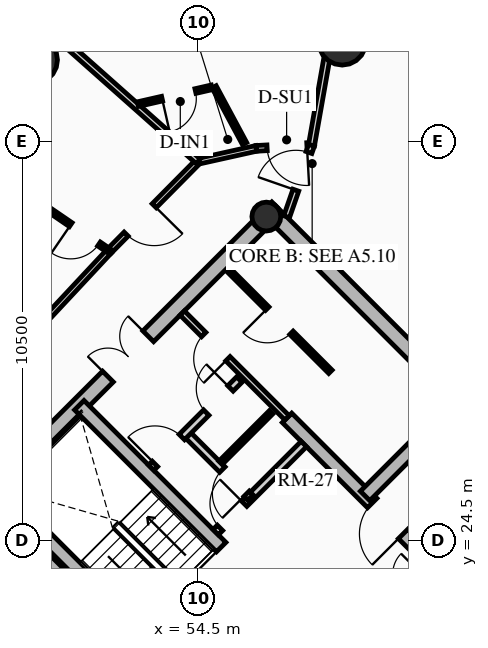
"""IFC4 building model, lengths in metres.
Left out: names, types, materials, properties, quantities, classifications, styles, units other than length and angle.
Written with IfcOpenShell. Run it as: python <this file> out.ifc"""

import sys

from ifc_helpers import new_model, si_unit, direction, frame, frame_2d, origin, origin_2d, place, context, subcontext, project, spatial, rectangle, circle, hollow_circle, extrude, source, transform, mapped, element, fill, save


model = new_model("IFC4")
c1 = context("Model", 3, precision=1e-05, world=origin(), true_north=direction((0.0, 1.0)))
c2 = subcontext(c1, "Body", "Model", "MODEL_VIEW")
j1 = project(units=[si_unit("LENGTHUNIT", "METRE"), si_unit("PLANEANGLEUNIT", "RADIAN")], contexts=[c1])
p1 = place(None, origin())
s1 = spatial("IfcSite", under=j1, at=p1, CompositionType="ELEMENT")
p2 = place(p1, origin())
s2 = spatial("IfcBuilding", under=s1, at=p2, CompositionType="ELEMENT")
p3 = place(p2, frame((0.0, 0.0, 151.6)))
s3 = spatial("IfcBuildingStorey", under=s2, at=p3, CompositionType="ELEMENT", Elevation=151.6)
for number, where, z_axis, x_axis in (
    (1, (58.702, 15.732, 0.0), (0.0, 0.0, 1.0), (-0.707, 0.707, 0.0)),
    (2, (66.268, 23.298, 0.0), (0.0, 0.0, 1.0), (-0.707, 0.707, 0.0)),
):
    element("IfcWall", number, at=place(p3, frame(where, z_axis=z_axis, x_axis=x_axis)), inside=s3, PredefinedType="SHEAR", context=c2, shape_type="SweptSolid", body=[
        extrude(rectangle(XDim=14.1, YDim=0.4, at=frame_2d((7.05, 0.0))), origin(), (0.0, 0.0, 1.0), 2.91),
    ])
p4 = place(p3, frame((48.873, 25.561, 0.0), z_axis=(0.0, 0.0, 1.0), x_axis=(0.707106781187, 0.707106781187, 0.0)))
e3 = element("IfcWall", 3, at=p4, inside=s3, PredefinedType="SHEAR", context=c2, shape_type="SweptSolid", body=[
    extrude(rectangle(XDim=10.7, YDim=0.4, at=frame_2d((5.35, 0.0))), origin(), (0.0, 0.0, 1.0), 2.91),
])
m1 = source(origin(), c2, "Body", "SweptSolid", [
    extrude(rectangle(XDim=1.5, YDim=2.02, at=frame_2d((0.75, 1.01))), frame((0.0, 0.21, 0.0), z_axis=(0.0, -1.0, 0.0), x_axis=(1.0, 0.0, 0.0)), (0.0, 0.0, 1.0), 0.42),
])
p5 = place(p4, frame((4.6, 0.0, 0.0)))
e4 = element("IfcOpeningElement", 4, at=p5, cuts=e3, PredefinedType="OPENING", context=c2, shape_type="MappedRepresentation", body=[
    mapped(m1, transform((0.0, 0.0, 0.0), x_axis=(1.0, 0.0, 0.0), y_axis=(0.0, 1.0, 0.0), z_axis=(0.0, 0.0, 1.0), scale=1.0)),
])
p6 = place(p3, frame((61.06, 18.373, 0.0), z_axis=(0.0, 0.0, 1.0), x_axis=(-0.707106781187, 0.707106781187, 0.0)))
e5 = element("IfcWall", 5, at=p6, inside=s3, PredefinedType="SHEAR", context=c2, shape_type="SweptSolid", body=[
    extrude(rectangle(XDim=13.7, YDim=0.35, at=frame_2d((6.85, 0.0))), origin(), (0.0, 0.0, 1.0), 2.91),
])
m2 = source(origin(), c2, "Body", "SweptSolid", [
    extrude(rectangle(XDim=1.1, YDim=2.015, at=frame_2d((0.55, 1.007))), frame((0.0, 0.185, 0.0), z_axis=(0.0, -1.0, 0.0), x_axis=(1.0, 0.0, 0.0)), (0.0, 0.0, 1.0), 0.37),
])
p7 = place(p6, frame((4.85, 0.0, 0.0)))
e6 = element("IfcOpeningElement", 6, at=p7, cuts=e5, PredefinedType="OPENING", context=c2, shape_type="MappedRepresentation", body=[
    mapped(m2, transform((0.0, 0.0, 0.0), x_axis=(1.0, 0.0, 0.0), y_axis=(0.0, 1.0, 0.0), z_axis=(0.0, 0.0, 1.0), scale=1.0)),
])
p8 = place(p6, frame((0.625, 0.0, 0.0)))
e7 = element("IfcOpeningElement", 7, at=p8, cuts=e5, PredefinedType="OPENING", context=c2, shape_type="MappedRepresentation", body=[
    mapped(m2, transform((0.0, 0.0, 0.0), x_axis=(1.0, 0.0, 0.0), y_axis=(0.0, 1.0, 0.0), z_axis=(0.0, 0.0, 1.0), scale=1.0)),
])
p9 = place(p6, frame((2.625, 0.0, 0.0)))
e8 = element("IfcOpeningElement", 8, at=p9, cuts=e5, PredefinedType="OPENING", context=c2, shape_type="MappedRepresentation", body=[
    mapped(m2, transform((0.0, 0.0, 0.0), x_axis=(1.0, 0.0, 0.0), y_axis=(0.0, 1.0, 0.0), z_axis=(0.0, 0.0, 1.0), scale=1.0)),
])
m3 = source(origin(), c2, "Body", "SweptSolid", [
    extrude(rectangle(XDim=1.15, YDim=2.02, at=frame_2d((0.575, 1.01))), frame((0.0, 0.185, 0.0), z_axis=(0.0, -1.0, 0.0), x_axis=(1.0, 0.0, 0.0)), (0.0, 0.0, 1.0), 0.37),
])
p10 = place(p6, frame((7.27, 0.0, 0.0)))
e9 = element("IfcOpeningElement", 9, at=p10, cuts=e5, PredefinedType="OPENING", context=c2, shape_type="MappedRepresentation", body=[
    mapped(m3, transform((0.0, 0.0, 0.0), x_axis=(1.0, 0.0, 0.0), y_axis=(0.0, 1.0, 0.0), z_axis=(0.0, 0.0, 1.0), scale=1.0)),
])
p11 = place(p3, frame((63.627, 20.94, 0.0), z_axis=(0.0, 0.0, 1.0), x_axis=(-0.707119496762, 0.707094065383, 0.0)))
e10 = element("IfcWall", 10, at=p11, inside=s3, PredefinedType="SHEAR", context=c2, shape_type="SweptSolid", body=[
    extrude(rectangle(XDim=9.6, YDim=0.35, at=frame_2d((4.8, 0.0))), origin(), (0.0, 0.0, 1.0), 2.91),
])
p12 = place(p11, frame((5.28, 0.0, 0.0)))
e11 = element("IfcOpeningElement", 11, at=p12, cuts=e10, PredefinedType="OPENING", context=c2, shape_type="MappedRepresentation", body=[
    mapped(m3, transform((0.0, 0.0, 0.0), x_axis=(1.0, 0.0, 0.0), y_axis=(0.0, 1.0, 0.0), z_axis=(0.0, 0.0, 1.0), scale=1.0)),
])
p13 = place(p3, frame((53.922, 21.141, 0.0), z_axis=(0.0, 0.0, 1.0), x_axis=(-0.707106781187, 0.707106781187, 0.0)))
e12 = element("IfcWall", 12, at=p13, inside=s3, PredefinedType="SHEAR", context=c2, shape_type="SweptSolid", body=[
    extrude(rectangle(XDim=6.695, YDim=0.35, at=frame_2d((3.348, 0.0))), origin(), (0.0, 0.0, 1.0), 2.91),
])
p14 = place(p3, frame((58.893, 25.674, 0.0), z_axis=(0.0, 0.0, 1.0), x_axis=(0.707106781187, 0.707106781187, 0.0)))
e13 = element("IfcWall", 13, at=p14, inside=s3, PredefinedType="SHEAR", context=c2, shape_type="SweptSolid", body=[
    extrude(rectangle(XDim=3.285, YDim=0.35, at=frame_2d((1.643, 0.0))), origin(), (0.0, 0.0, 1.0), 2.91),
])
p15 = place(p3, frame((56.294, 33.024, 0.0), z_axis=(0.0, 0.0, 1.0), x_axis=(0.707106781187, 0.707106781187, 0.0)))
e14 = element("IfcColumn", 14, at=p15, inside=s3, PredefinedType="COLUMN", context=c2, shape_type="SweptSolid", body=[
    extrude(hollow_circle(Radius=0.38, WallThickness=0.032, at=origin_2d()), origin(), (0.0, 0.0, 1.0), 2.91),
])
for number, where, z_axis, x_axis in (
    (15, (58.291, 37.635, 0.0), (0.0, 0.0, 1.0), (1.0, 0.0, 0.0)),
    (16, (50.173, 37.146, 0.0), (0.0, 0.0, 1.0), (1.0, 0.0, 0.0)),
):
    element("IfcColumn", number, at=place(p3, frame(where, z_axis=z_axis, x_axis=x_axis)), inside=s3, PredefinedType="USERDEFINED", context=c2, shape_type="SweptSolid", body=[
        extrude(circle(Radius=0.625, at=origin_2d()), origin(), (0.0, 0.0, 1.0), 2.91),
    ])
p16 = place(p3, frame((58.214, 21.467, 0.0), z_axis=(0.0, 0.0, 1.0), x_axis=(0.707106781187, 0.707106781187, 0.0)))
e17 = element("IfcWall", 17, at=p16, inside=s3, PredefinedType="PARTITIONING", context=c2, shape_type="SweptSolid", body=[
    extrude(rectangle(XDim=3.28, YDim=0.2, at=frame_2d((1.64, 0.0))), origin(), (0.0, 0.0, 1.0), 2.675),
])
m4 = source(origin(), c2, "Body", "SweptSolid", [
    extrude(rectangle(XDim=1.5, YDim=2.02, at=frame_2d((0.75, 1.01))), frame((0.0, 0.11, 0.0), z_axis=(0.0, -1.0, 0.0), x_axis=(1.0, 0.0, 0.0)), (0.0, 0.0, 1.0), 0.22),
])
p17 = place(p16, frame((1.55, 0.0, 0.0)))
e18 = element("IfcOpeningElement", 18, at=p17, cuts=e17, PredefinedType="OPENING", context=c2, shape_type="MappedRepresentation", body=[
    mapped(m4, transform((0.0, 0.0, 0.0), x_axis=(1.0, 0.0, 0.0), y_axis=(0.0, 1.0, 0.0), z_axis=(0.0, 0.0, 1.0), scale=1.0)),
])
p18 = place(p3, frame((54.961, 24.719, 0.0), z_axis=(0.0, 0.0, 1.0), x_axis=(0.707106781187, 0.707106781187, 0.0)))
e19 = element("IfcWall", 19, at=p18, inside=s3, PredefinedType="PARTITIONING", context=c2, shape_type="SweptSolid", body=[
    extrude(rectangle(XDim=3.28, YDim=0.2, at=frame_2d((1.64, 0.0))), origin(), (0.0, 0.0, 1.0), 2.675),
])
m5 = source(origin(), c2, "Body", "SweptSolid", [
    extrude(rectangle(XDim=0.9, YDim=2.005, at=frame_2d((0.45, 1.002))), frame((0.0, 0.11, 0.0), z_axis=(0.0, -1.0, 0.0), x_axis=(1.0, 0.0, 0.0)), (0.0, 0.0, 1.0), 0.22),
])
p19 = place(p18, frame((0.16, 0.0, 0.0)))
e20 = element("IfcOpeningElement", 20, at=p19, cuts=e19, PredefinedType="OPENING", context=c2, shape_type="MappedRepresentation", body=[
    mapped(m5, transform((0.0, 0.0, 0.0), x_axis=(1.0, 0.0, 0.0), y_axis=(0.0, 1.0, 0.0), z_axis=(0.0, 0.0, 1.0), scale=1.0)),
])
p20 = place(p3, frame((55.874, 25.631, 0.0), z_axis=(0.0, 0.0, 1.0), x_axis=(-0.707157639372, 0.707055919343, 0.0)))
e21 = element("IfcWall", 21, at=p20, inside=s3, PredefinedType="PARTITIONING", context=c2, shape_type="SweptSolid", body=[
    extrude(rectangle(XDim=2.4, YDim=0.2, at=frame_2d((1.2, 0.0))), origin(), (0.0, 0.0, 1.0), 2.675),
])
p21 = place(p20, frame((0.14, 0.0, 0.0)))
e22 = element("IfcOpeningElement", 22, at=p21, cuts=e21, PredefinedType="OPENING", context=c2, shape_type="MappedRepresentation", body=[
    mapped(m5, transform((0.0, 0.0, 0.0), x_axis=(1.0, 0.0, 0.0), y_axis=(0.0, 1.0, 0.0), z_axis=(0.0, 0.0, 1.0), scale=1.0)),
])
p22 = place(p3, frame((53.264, 26.416, 0.0), z_axis=(0.0, 0.0, 1.0), x_axis=(0.707106781187, 0.707106781187, 0.0)))
e23 = element("IfcWall", 23, at=p22, inside=s3, PredefinedType="PARTITIONING", context=c2, shape_type="SweptSolid", body=[
    extrude(rectangle(XDim=3.28, YDim=0.2, at=frame_2d((1.64, 0.0))), origin(), (0.0, 0.0, 1.0), 2.675),
])
m6 = source(origin(), c2, "Body", "SweptSolid", [
    extrude(rectangle(XDim=1.0, YDim=2.015, at=frame_2d((0.5, 1.007))), frame((0.0, 0.11, 0.0), z_axis=(0.0, -1.0, 0.0), x_axis=(1.0, 0.0, 0.0)), (0.0, 0.0, 1.0), 0.22),
])
p23 = place(p22, frame((0.14, 0.0, 0.0)))
e24 = element("IfcOpeningElement", 24, at=p23, cuts=e23, PredefinedType="OPENING", context=c2, shape_type="MappedRepresentation", body=[
    mapped(m6, transform((0.0, 0.0, 0.0), x_axis=(1.0, 0.0, 0.0), y_axis=(0.0, 1.0, 0.0), z_axis=(0.0, 0.0, 1.0), scale=1.0)),
])
p24 = place(p22, frame((2.05, 0.0, 0.0)))
e25 = element("IfcOpeningElement", 25, at=p24, cuts=e23, PredefinedType="OPENING", context=c2, shape_type="MappedRepresentation", body=[
    mapped(m5, transform((0.0, 0.0, 0.0), x_axis=(1.0, 0.0, 0.0), y_axis=(0.0, 1.0, 0.0), z_axis=(0.0, 0.0, 1.0), scale=1.0)),
])
p25 = place(p3, frame((55.089, 26.543, 0.0), z_axis=(0.0, 0.0, 1.0), x_axis=(0.707106781187, 0.707106781187, 0.0)))
e26 = element("IfcWall", 26, at=p25, inside=s3, PredefinedType="PARTITIONING", context=c2, shape_type="SweptSolid", body=[
    extrude(rectangle(XDim=1.88, YDim=0.125, at=frame_2d((0.94, 0.0))), origin(), (0.0, 0.0, 1.0), 2.675),
])
p26 = place(p3, frame((56.839, 27.728, 0.0), z_axis=(0.0, 0.0, 1.0), x_axis=(-0.707106781187, 0.707106781187, 0.0)))
e27 = element("IfcWall", 27, at=p26, inside=s3, PredefinedType="PARTITIONING", context=c2, shape_type="SweptSolid", body=[
    extrude(rectangle(XDim=3.9, YDim=0.16, at=frame_2d((1.95, 0.0))), origin(), (0.0, 0.0, 1.0), 2.675),
])
m7 = source(origin(), c2, "Body", "SweptSolid", [
    extrude(rectangle(XDim=0.9, YDim=2.005, at=frame_2d((0.45, 1.002))), frame((0.0, 0.09, 0.0), z_axis=(0.0, -1.0, 0.0), x_axis=(1.0, 0.0, 0.0)), (0.0, 0.0, 1.0), 0.18),
])
p27 = place(p26, frame((2.2, 0.0, 0.0)))
e28 = element("IfcOpeningElement", 28, at=p27, cuts=e27, PredefinedType="OPENING", context=c2, shape_type="MappedRepresentation", body=[
    mapped(m7, transform((0.0, 0.0, 0.0), x_axis=(1.0, 0.0, 0.0), y_axis=(0.0, 1.0, 0.0), z_axis=(0.0, 0.0, 1.0), scale=1.0)),
])
p28 = place(p3, frame((57.981, 28.941, 0.0), z_axis=(0.0, 0.0, 1.0), x_axis=(-0.707074823725, 0.707138737204, 0.0)))
e29 = element("IfcWall", 29, at=p28, inside=s3, PredefinedType="PARTITIONING", context=c2, shape_type="SweptSolid", body=[
    extrude(rectangle(XDim=3.82, YDim=0.125, at=frame_2d((1.91, 0.0))), origin(), (0.0, 0.0, 1.0), 2.675),
])
m8 = source(origin(), c2, "Body", "SweptSolid", [
    extrude(rectangle(XDim=0.9, YDim=2.005, at=frame_2d((0.45, 1.002))), frame((0.0, 0.073, 0.0), z_axis=(0.0, -1.0, 0.0), x_axis=(1.0, 0.0, 0.0)), (0.0, 0.0, 1.0), 0.145),
])
p29 = place(p28, frame((1.45, 0.0, 0.0)))
e30 = element("IfcOpeningElement", 30, at=p29, cuts=e29, PredefinedType="OPENING", context=c2, shape_type="MappedRepresentation", body=[
    mapped(m8, transform((0.0, 0.0, 0.0), x_axis=(1.0, 0.0, 0.0), y_axis=(0.0, 1.0, 0.0), z_axis=(0.0, 0.0, 1.0), scale=1.0)),
])
p30 = place(p3, frame((57.482, 34.899, 0.0), z_axis=(0.0, 0.0, 1.0), x_axis=(-0.998466026722, -0.055367801852, 0.0)))
e31 = element("IfcWall", 31, at=p30, inside=s3, PredefinedType="PARTITIONING", context=c2, shape_type="SweptSolid", body=[
    extrude(rectangle(XDim=1.455, YDim=0.15, at=frame_2d((0.728, 0.0))), origin(), (0.0, 0.0, 1.0), 2.245),
])
m9 = source(origin(), c2, "Body", "SweptSolid", [
    extrude(rectangle(XDim=1.05, YDim=2.015, at=frame_2d((0.525, 1.007))), frame((0.0, 0.085, 0.0), z_axis=(0.0, -1.0, 0.0), x_axis=(1.0, 0.0, 0.0)), (0.0, 0.0, 1.0), 0.17),
])
p31 = place(p30, frame((0.12, 0.0, 0.0)))
e32 = element("IfcOpeningElement", 32, at=p31, cuts=e31, PredefinedType="OPENING", context=c2, shape_type="MappedRepresentation", body=[
    mapped(m9, transform((0.0, 0.0, 0.0), x_axis=(1.0, 0.0, 0.0), y_axis=(0.0, 1.0, 0.0), z_axis=(0.0, 0.0, 1.0), scale=1.0)),
])
p32 = place(p3, frame((56.029, 34.819, 0.0), z_axis=(0.0, 0.0, 1.0), x_axis=(-0.976117289068, -0.217244189754, 0.0)))
e33 = element("IfcWall", 33, at=p32, inside=s3, PredefinedType="PARTITIONING", context=c2, shape_type="SweptSolid", body=[
    extrude(rectangle(XDim=1.565, YDim=0.15, at=frame_2d((0.783, 0.0))), origin(), (0.0, 0.0, 1.0), 2.245),
])
p33 = place(p3, frame((54.501, 34.479, 0.0), z_axis=(0.0, 0.0, 1.0), x_axis=(-0.70346073929, -0.710734119258, 0.0)))
e34 = element("IfcWall", 34, at=p33, inside=s3, PredefinedType="PARTITIONING", context=c2, shape_type="SweptSolid", body=[
    extrude(rectangle(XDim=3.323, YDim=0.15, at=frame_2d((1.662, 0.0))), origin(), (0.0, 0.0, 1.0), 2.245),
])
p34 = place(p33, frame((1.645, 0.0, 0.0)))
e35 = element("IfcOpeningElement", 35, at=p34, cuts=e34, PredefinedType="OPENING", context=c2, shape_type="MappedRepresentation", body=[
    mapped(m9, transform((0.0, 0.0, 0.0), x_axis=(1.0, 0.0, 0.0), y_axis=(0.0, 1.0, 0.0), z_axis=(0.0, 0.0, 1.0), scale=1.0)),
])
p35 = place(p3, frame((52.163, 32.117, 0.0), z_axis=(0.0, 0.0, 1.0), x_axis=(-0.682485296115, -0.730899323154, 0.0)))
e36 = element("IfcWall", 36, at=p35, inside=s3, PredefinedType="PARTITIONING", context=c2, shape_type="SweptSolid", body=[
    extrude(rectangle(XDim=6.404, YDim=0.15, at=frame_2d((3.202, 0.0))), origin(), (0.0, 0.0, 1.0), 2.245),
])
p36 = place(p3, frame((57.482, 34.899, 0.0), z_axis=(0.0, 0.0, 1.0), x_axis=(0.174251112754, 0.98470124896, 0.0)))
e37 = element("IfcWall", 37, at=p36, inside=s3, PredefinedType="PARTITIONING", context=c2, shape_type="SweptSolid", body=[
    extrude(rectangle(XDim=5.352, YDim=0.16, at=frame_2d((2.676, 0.0))), origin(), (0.0, 0.0, 1.0), 2.245),
])
p37 = place(p3, frame((54.501, 34.479, 0.0), z_axis=(0.0, 0.0, 1.0), x_axis=(-0.747641382601, 0.66410267506, 0.0)))
e38 = element("IfcWall", 38, at=p37, inside=s3, PredefinedType="PARTITIONING", context=c2, shape_type="SweptSolid", body=[
    extrude(rectangle(XDim=7.718, YDim=0.16, at=frame_2d((3.859, 0.0))), origin(), (0.0, 0.0, 1.0), 2.245),
])
p38 = place(p3, frame((56.828, 33.021, 0.0), z_axis=(0.0, 0.0, 1.0), x_axis=(0.328682472103, 0.944440486496, 0.0)))
e39 = element("IfcWall", 39, at=p38, inside=s3, PredefinedType="PARTITIONING", context=c2, shape_type="SweptSolid", body=[
    extrude(rectangle(XDim=1.989, YDim=0.16, at=frame_2d((0.995, 0.0))), origin(), (0.0, 0.0, 1.0), 2.245),
])
m10 = source(origin(), c2, "Body", "SweptSolid", [
    extrude(rectangle(XDim=1.05, YDim=2.015, at=frame_2d((0.525, 1.007))), frame((0.0, 0.09, 0.0), z_axis=(0.0, -1.0, 0.0), x_axis=(1.0, 0.0, 0.0)), (0.0, 0.0, 1.0), 0.18),
])
p39 = place(p38, frame((0.739, 0.0, 0.0)))
e40 = element("IfcOpeningElement", 40, at=p39, cuts=e39, PredefinedType="OPENING", context=c2, shape_type="MappedRepresentation", body=[
    mapped(m10, transform((0.0, 0.0, 0.0), x_axis=(1.0, 0.0, 0.0), y_axis=(0.0, 1.0, 0.0), z_axis=(0.0, 0.0, 1.0), scale=1.0)),
])
p40 = place(p3, frame((55.722, 34.944, 0.0), z_axis=(0.0, 0.0, 1.0), x_axis=(-0.473482169178, 0.880803403417, 0.0)))
e41 = element("IfcWall", 41, at=p40, inside=s3, PredefinedType="PARTITIONING", context=c2, shape_type="SweptSolid", body=[
    extrude(rectangle(XDim=1.698, YDim=0.125, at=frame_2d((0.849, 0.0))), origin(), (0.0, 0.0, 1.0), 2.245),
])
p41 = place(p3, frame((54.858, 36.425, 0.0), z_axis=(0.0, 0.0, 1.0), x_axis=(-0.975061820415, -0.221933427785, 0.0)))
e42 = element("IfcWall", 42, at=p41, inside=s3, PredefinedType="PARTITIONING", context=c2, shape_type="SweptSolid", body=[
    extrude(rectangle(XDim=1.993, YDim=0.125, at=frame_2d((0.997, 0.0))), origin(), (0.0, 0.0, 1.0), 2.312),
])
p42 = place(p41, frame((0.44, 0.0, 0.0)))
e43 = element("IfcOpeningElement", 43, at=p42, cuts=e42, PredefinedType="OPENING", context=c2, shape_type="MappedRepresentation", body=[
    mapped(m8, transform((0.0, 0.0, 0.0), x_axis=(1.0, 0.0, 0.0), y_axis=(0.0, 1.0, 0.0), z_axis=(0.0, 0.0, 1.0), scale=1.0)),
])
p43 = place(p3, frame((52.163, 32.117, 0.0), z_axis=(0.0, 0.0, 1.0), x_axis=(-0.825403853282, 0.564542716707, 0.0)))
e44 = element("IfcWall", 44, at=p43, inside=s3, PredefinedType="PARTITIONING", context=c2, shape_type="SweptSolid", body=[
    extrude(rectangle(XDim=8.74, YDim=0.125, at=frame_2d((4.37, 0.0))), origin(), (0.0, 0.0, 1.0), 2.245),
])
p44 = place(p43, frame((0.33, 0.0, 0.0)))
e45 = element("IfcOpeningElement", 45, at=p44, cuts=e44, PredefinedType="OPENING", context=c2, shape_type="MappedRepresentation", body=[
    mapped(m8, transform((0.0, 0.0, 0.0), x_axis=(1.0, 0.0, 0.0), y_axis=(0.0, 1.0, 0.0), z_axis=(0.0, 0.0, 1.0), scale=1.0)),
])
m11 = source(origin(), c2, "Body", "SweptSolid", [
    extrude(rectangle(XDim=1.15, YDim=2.02, at=frame_2d((0.575, 1.01))), frame((0.0, 0.025, 0.0), z_axis=(0.0, -1.0, 0.0), x_axis=(1.0, 0.0, 0.0)), (0.0, 0.0, 1.0), 0.05),
])
p45 = place(p10, origin())
e46 = element("IfcDoor", 46, at=p45, inside=s3, OperationType="SINGLE_SWING_RIGHT", PredefinedType="DOOR", context=c2, shape_type="MappedRepresentation", body=[
    mapped(m11, transform((0.0, 0.0, 0.0), x_axis=(1.0, 0.0, 0.0), y_axis=(0.0, 1.0, 0.0), z_axis=(0.0, 0.0, 1.0), scale=1.0)),
])
fill(e9, e46)
p46 = place(p12, origin())
e47 = element("IfcDoor", 47, at=p46, inside=s3, OperationType="SINGLE_SWING_LEFT", PredefinedType="DOOR", context=c2, shape_type="MappedRepresentation", body=[
    mapped(m11, transform((0.0, 0.0, 0.0), x_axis=(1.0, 0.0, 0.0), y_axis=(0.0, 1.0, 0.0), z_axis=(0.0, 0.0, 1.0), scale=1.0)),
])
fill(e11, e47)
m12 = source(origin(), c2, "Body", "SweptSolid", [
    extrude(rectangle(XDim=1.5, YDim=2.02, at=frame_2d((0.75, 1.01))), frame((0.0, 0.025, 0.0), z_axis=(0.0, -1.0, 0.0), x_axis=(1.0, 0.0, 0.0)), (0.0, 0.0, 1.0), 0.05),
])
p47 = place(p5, origin())
e48 = element("IfcDoor", 48, at=p47, inside=s3, OperationType="DOUBLE_DOOR_SINGLE_SWING", PredefinedType="DOOR", context=c2, shape_type="MappedRepresentation", body=[
    mapped(m12, transform((0.0, 0.0, 0.0), x_axis=(1.0, 0.0, 0.0), y_axis=(0.0, 1.0, 0.0), z_axis=(0.0, 0.0, 1.0), scale=1.0)),
])
fill(e4, e48)
m13 = source(origin(), c2, "Body", "SweptSolid", [
    extrude(rectangle(XDim=0.9, YDim=2.005, at=frame_2d((0.45, 1.002))), frame((0.0, 0.025, 0.0), z_axis=(0.0, -1.0, 0.0), x_axis=(1.0, 0.0, 0.0)), (0.0, 0.0, 1.0), 0.05),
])
p48 = place(p19, origin())
e49 = element("IfcDoor", 49, at=p48, inside=s3, OperationType="SINGLE_SWING_RIGHT", PredefinedType="DOOR", context=c2, shape_type="MappedRepresentation", body=[
    mapped(m13, transform((0.0, 0.0, 0.0), x_axis=(1.0, 0.0, 0.0), y_axis=(0.0, 1.0, 0.0), z_axis=(0.0, 0.0, 1.0), scale=1.0)),
])
fill(e20, e49)
m14 = source(origin(), c2, "Body", "SweptSolid", [
    extrude(rectangle(XDim=1.0, YDim=2.015, at=frame_2d((0.5, 1.007))), frame((0.0, 0.025, 0.0), z_axis=(0.0, -1.0, 0.0), x_axis=(1.0, 0.0, 0.0)), (0.0, 0.0, 1.0), 0.05),
])
p49 = place(p23, origin())
e50 = element("IfcDoor", 50, at=p49, inside=s3, OperationType="SINGLE_SWING_LEFT", PredefinedType="DOOR", context=c2, shape_type="MappedRepresentation", body=[
    mapped(m14, transform((0.0, 0.0, 0.0), x_axis=(1.0, 0.0, 0.0), y_axis=(0.0, 1.0, 0.0), z_axis=(0.0, 0.0, 1.0), scale=1.0)),
])
fill(e24, e50)
p50 = place(p21, origin())
e51 = element("IfcDoor", 51, at=p50, inside=s3, OperationType="SINGLE_SWING_LEFT", PredefinedType="DOOR", context=c2, shape_type="MappedRepresentation", body=[
    mapped(m13, transform((0.0, 0.0, 0.0), x_axis=(1.0, 0.0, 0.0), y_axis=(0.0, 1.0, 0.0), z_axis=(0.0, 0.0, 1.0), scale=1.0)),
])
fill(e22, e51)
p51 = place(p24, origin())
e52 = element("IfcDoor", 52, at=p51, inside=s3, OperationType="SINGLE_SWING_RIGHT", PredefinedType="DOOR", context=c2, shape_type="MappedRepresentation", body=[
    mapped(m13, transform((0.0, 0.0, 0.0), x_axis=(1.0, 0.0, 0.0), y_axis=(0.0, 1.0, 0.0), z_axis=(0.0, 0.0, 1.0), scale=1.0)),
])
fill(e25, e52)
p52 = place(p27, origin())
e53 = element("IfcDoor", 53, at=p52, inside=s3, OperationType="SINGLE_SWING_LEFT", PredefinedType="DOOR", context=c2, shape_type="MappedRepresentation", body=[
    mapped(m13, transform((0.0, 0.0, 0.0), x_axis=(1.0, 0.0, 0.0), y_axis=(0.0, 1.0, 0.0), z_axis=(0.0, 0.0, 1.0), scale=1.0)),
])
fill(e28, e53)
p53 = place(p29, origin())
e54 = element("IfcDoor", 54, at=p53, inside=s3, OperationType="SINGLE_SWING_RIGHT", PredefinedType="DOOR", context=c2, shape_type="MappedRepresentation", body=[
    mapped(m13, transform((0.0, 0.0, 0.0), x_axis=(1.0, 0.0, 0.0), y_axis=(0.0, 1.0, 0.0), z_axis=(0.0, 0.0, 1.0), scale=1.0)),
])
fill(e30, e54)
m15 = source(origin(), c2, "Body", "SweptSolid", [
    extrude(rectangle(XDim=1.05, YDim=2.015, at=frame_2d((0.525, 1.007))), frame((0.0, 0.025, 0.0), z_axis=(0.0, -1.0, 0.0), x_axis=(1.0, 0.0, 0.0)), (0.0, 0.0, 1.0), 0.05),
])
p54 = place(p39, origin())
e55 = element("IfcDoor", 55, at=p54, inside=s3, OperationType="SINGLE_SWING_LEFT", PredefinedType="DOOR", context=c2, shape_type="MappedRepresentation", body=[
    mapped(m15, transform((0.0, 0.0, 0.0), x_axis=(1.0, 0.0, 0.0), y_axis=(0.0, 1.0, 0.0), z_axis=(0.0, 0.0, 1.0), scale=1.0)),
])
fill(e40, e55)
p55 = place(p31, origin())
e56 = element("IfcDoor", 56, at=p55, inside=s3, OperationType="SINGLE_SWING_LEFT", PredefinedType="DOOR", context=c2, shape_type="MappedRepresentation", body=[
    mapped(m15, transform((0.0, 0.0, 0.0), x_axis=(1.0, 0.0, 0.0), y_axis=(0.0, 1.0, 0.0), z_axis=(0.0, 0.0, 1.0), scale=1.0)),
])
fill(e32, e56)
p56 = place(p42, origin())
e57 = element("IfcDoor", 57, at=p56, inside=s3, OperationType="SINGLE_SWING_RIGHT", PredefinedType="DOOR", context=c2, shape_type="MappedRepresentation", body=[
    mapped(m13, transform((0.0, 0.0, 0.0), x_axis=(1.0, 0.0, 0.0), y_axis=(0.0, 1.0, 0.0), z_axis=(0.0, 0.0, 1.0), scale=1.0)),
])
fill(e43, e57)
p57 = place(p34, origin())
e58 = element("IfcDoor", 58, at=p57, inside=s3, OperationType="SINGLE_SWING_LEFT", PredefinedType="DOOR", context=c2, shape_type="MappedRepresentation", body=[
    mapped(m15, transform((0.0, 0.0, 0.0), x_axis=(1.0, 0.0, 0.0), y_axis=(0.0, 1.0, 0.0), z_axis=(0.0, 0.0, 1.0), scale=1.0)),
])
fill(e35, e58)
p58 = place(p44, origin())
e59 = element("IfcDoor", 59, at=p58, inside=s3, OperationType="SINGLE_SWING_RIGHT", PredefinedType="DOOR", context=c2, shape_type="MappedRepresentation", body=[
    mapped(m13, transform((0.0, 0.0, 0.0), x_axis=(1.0, 0.0, 0.0), y_axis=(0.0, 1.0, 0.0), z_axis=(0.0, 0.0, 1.0), scale=1.0)),
])
fill(e45, e59)
save(model, sys.argv[1])
